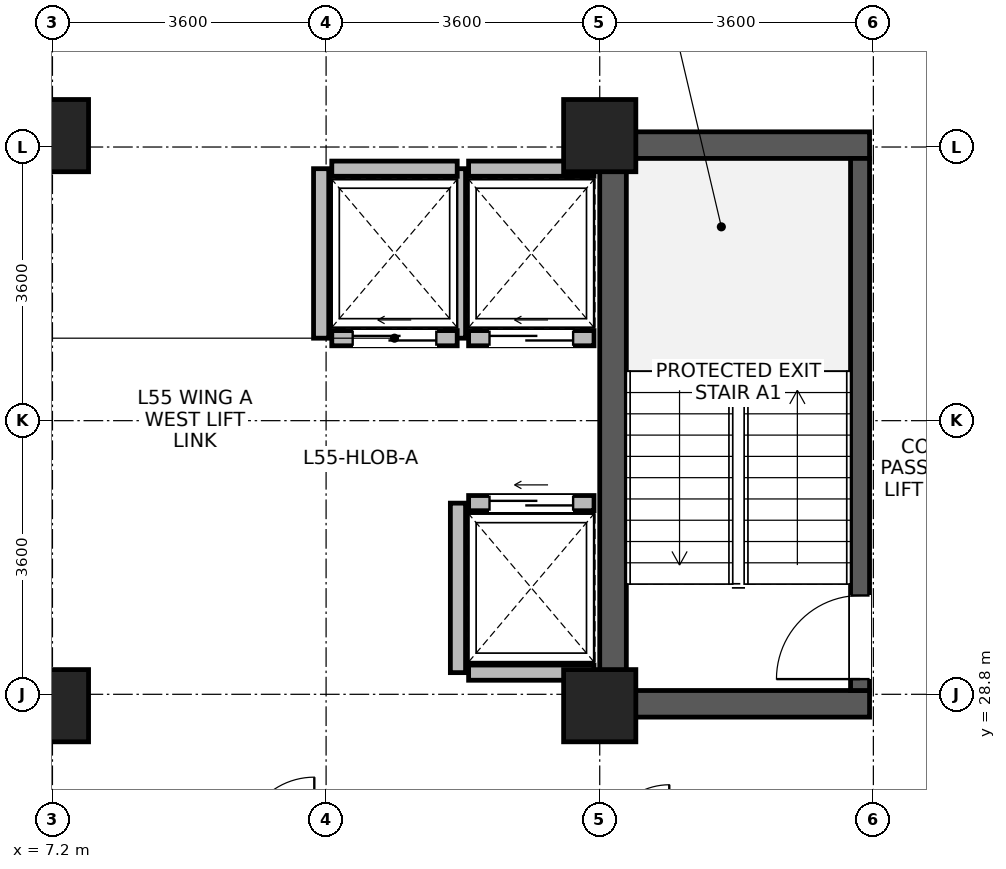
"""IFC4 building model, lengths in metres.
Left out: names, types, materials, properties, quantities, classifications, styles, units other than length and angle.
Written with IfcOpenShell. Run it as: python <this file> out.ifc"""

import sys

from ifc_helpers import new_model, si_unit, direction, frame, frame_2d, origin, origin_2d, place, context, subcontext, project, spatial, rectangle, extrude, source, transform, mapped, element, fill, save


model = new_model("IFC4")
c1 = context("Model", 3, precision=1e-05, world=origin(), true_north=direction((0.0, 1.0)))
c2 = subcontext(c1, "Body", "Model", "MODEL_VIEW")
j1 = project(units=[si_unit("LENGTHUNIT", "METRE"), si_unit("PLANEANGLEUNIT", "RADIAN")], contexts=[c1])
p1 = place(None, origin())
s1 = spatial("IfcSite", under=j1, at=p1, CompositionType="ELEMENT")
p2 = place(p1, origin())
s2 = spatial("IfcBuilding", under=s1, at=p2, CompositionType="ELEMENT")
p3 = place(p2, frame((0.0, 0.0, 216.6)))
s3 = spatial("IfcBuildingStorey", under=s2, at=p3, CompositionType="ELEMENT", Elevation=216.6)
p4 = place(p3, frame((14.575, 28.5, 0.0), z_axis=(0.0, 0.0, 1.0), x_axis=(0.0, 1.0, 0.0)))
e1 = element("IfcWall", 1, at=p4, inside=s3, PredefinedType="SHEAR", context=c2, shape_type="SweptSolid", body=[
    extrude(rectangle(XDim=7.7, YDim=0.35, at=frame_2d((3.85, 0.0))), origin(), (0.0, 0.0, 1.0), 3.47),
])
for number, where, z_axis, x_axis in (
    (2, (14.75, 28.675, 0.0), (0.0, 0.0, 1.0), (1.0, 0.0, 0.0)),
    (3, (14.75, 36.025, 0.0), (0.0, 0.0, 1.0), (1.0, 0.0, 0.0)),
):
    element("IfcWall", number, at=place(p3, frame(where, z_axis=z_axis, x_axis=x_axis)), inside=s3, PredefinedType="SHEAR", context=c2, shape_type="SweptSolid", body=[
        extrude(rectangle(XDim=3.2, YDim=0.35, at=frame_2d((1.6, 0.0))), origin(), (0.0, 0.0, 1.0), 3.47),
    ])
p5 = place(p3, frame((17.825, 28.85, 0.0), z_axis=(0.0, 0.0, 1.0), x_axis=(0.0, 1.0, 0.0)))
e4 = element("IfcWall", 4, at=p5, inside=s3, PredefinedType="SHEAR", context=c2, shape_type="SweptSolid", body=[
    extrude(rectangle(XDim=7.0, YDim=0.25, at=frame_2d((3.5, 0.0))), origin(), (0.0, 0.0, 1.0), 3.47),
])
p6 = place(p5, frame((0.15, 0.0, 0.0)))
e5 = element("IfcOpeningElement", 5, at=p6, cuts=e4, PredefinedType="OPENING", context=c2, shape_type="SweptSolid", body=[
    extrude(rectangle(XDim=1.1, YDim=2.08, at=frame_2d((0.55, 1.04))), frame((0.0, 0.135, 0.0), z_axis=(0.0, -1.0, 0.0), x_axis=(1.0, 0.0, 0.0)), (0.0, 0.0, 1.0), 0.27),
])
m1 = source(origin(), c2, "Body", "SweptSolid", [
    extrude(rectangle(XDim=0.95, YDim=0.95, at=origin_2d()), origin(), (0.0, 0.0, 1.0), 3.7),
])
for number, where, z_axis, x_axis in (
    (6, (7.2, 28.65, 0.0), (0.0, 0.0, 1.0), (1.0, 0.0, 0.0)),
    (7, (7.2, 36.15, 0.0), (0.0, 0.0, 1.0), (1.0, 0.0, 0.0)),
    (8, (14.4, 28.65, 0.0), (0.0, 0.0, 1.0), (1.0, 0.0, 0.0)),
    (9, (14.4, 36.15, 0.0), (0.0, 0.0, 1.0), (1.0, 0.0, 0.0)),
):
    element("IfcColumn", number, at=place(p3, frame(where, z_axis=z_axis, x_axis=x_axis)), inside=s3, PredefinedType="COLUMN", context=c2, shape_type="MappedRepresentation", body=[
        mapped(m1, transform((0.0, 0.0, 0.0), x_axis=(1.0, 0.0, 0.0), y_axis=(0.0, 1.0, 0.0), z_axis=(0.0, 0.0, 1.0), scale=1.0)),
    ])
p7 = place(p3, frame((12.675, 33.485, 0.0), z_axis=(0.0, 0.0, 1.0), x_axis=(1.0, 0.0, 0.0)))
e10 = element("IfcWall", 10, at=p7, inside=s3, PredefinedType="PARTITIONING", context=c2, shape_type="SweptSolid", body=[
    extrude(rectangle(XDim=1.65, YDim=0.2, at=frame_2d((0.825, 0.0))), origin(), (0.0, 0.0, 1.0), 3.45),
])
p8 = place(p7, frame((0.275, 0.0, 0.0)))
e11 = element("IfcOpeningElement", 11, at=p8, cuts=e10, PredefinedType="OPENING", context=c2, shape_type="SweptSolid", body=[
    extrude(rectangle(XDim=1.1, YDim=2.12, at=frame_2d((0.55, 1.06))), frame((0.0, 0.11, 0.0), z_axis=(0.0, -1.0, 0.0), x_axis=(1.0, 0.0, 0.0)), (0.0, 0.0, 1.0), 0.22),
])
p9 = place(p3, frame((12.675, 35.715, 0.0), z_axis=(0.0, 0.0, 1.0), x_axis=(1.0, 0.0, 0.0)))
e12 = element("IfcWall", 12, at=p9, inside=s3, PredefinedType="PARTITIONING", context=c2, shape_type="SweptSolid", body=[
    extrude(rectangle(XDim=1.65, YDim=0.2, at=frame_2d((0.825, 0.0))), origin(), (0.0, 0.0, 1.0), 3.45),
])
p10 = place(p3, frame((12.535, 33.485, 0.0), z_axis=(0.0, 0.0, 1.0), x_axis=(0.0, 1.0, 0.0)))
e13 = element("IfcWall", 13, at=p10, inside=s3, PredefinedType="PARTITIONING", context=c2, shape_type="SweptSolid", body=[
    extrude(rectangle(XDim=2.23, YDim=0.2, at=frame_2d((1.115, 0.0))), origin(), (0.0, 0.0, 1.0), 3.45),
])
p11 = place(p3, frame((12.675, 29.085, 0.0), z_axis=(0.0, 0.0, 1.0), x_axis=(1.0, 0.0, 0.0)))
e14 = element("IfcWall", 14, at=p11, inside=s3, PredefinedType="PARTITIONING", context=c2, shape_type="SweptSolid", body=[
    extrude(rectangle(XDim=1.65, YDim=0.2, at=frame_2d((0.825, 0.0))), origin(), (0.0, 0.0, 1.0), 3.45),
])
p12 = place(p3, frame((12.675, 31.315, 0.0), z_axis=(0.0, 0.0, 1.0), x_axis=(1.0, 0.0, 0.0)))
e15 = element("IfcWall", 15, at=p12, inside=s3, PredefinedType="PARTITIONING", context=c2, shape_type="SweptSolid", body=[
    extrude(rectangle(XDim=1.65, YDim=0.2, at=frame_2d((0.825, 0.0))), origin(), (0.0, 0.0, 1.0), 3.45),
])
p13 = place(p12, frame((0.275, 0.0, 0.0)))
e16 = element("IfcOpeningElement", 16, at=p13, cuts=e15, PredefinedType="OPENING", context=c2, shape_type="SweptSolid", body=[
    extrude(rectangle(XDim=1.1, YDim=2.12, at=frame_2d((0.55, 1.06))), frame((0.0, 0.11, 0.0), z_axis=(0.0, -1.0, 0.0), x_axis=(1.0, 0.0, 0.0)), (0.0, 0.0, 1.0), 0.22),
])
p14 = place(p3, frame((12.535, 29.085, 0.0), z_axis=(0.0, 0.0, 1.0), x_axis=(0.0, 1.0, 0.0)))
e17 = element("IfcWall", 17, at=p14, inside=s3, PredefinedType="PARTITIONING", context=c2, shape_type="SweptSolid", body=[
    extrude(rectangle(XDim=2.23, YDim=0.2, at=frame_2d((1.115, 0.0))), origin(), (0.0, 0.0, 1.0), 3.45),
])
p15 = place(p3, frame((10.875, 33.485, 0.0), z_axis=(0.0, 0.0, 1.0), x_axis=(1.0, 0.0, 0.0)))
e18 = element("IfcWall", 18, at=p15, inside=s3, PredefinedType="PARTITIONING", context=c2, shape_type="SweptSolid", body=[
    extrude(rectangle(XDim=1.65, YDim=0.2, at=frame_2d((0.825, 0.0))), origin(), (0.0, 0.0, 1.0), 3.45),
])
p16 = place(p15, frame((0.275, 0.0, 0.0)))
e19 = element("IfcOpeningElement", 19, at=p16, cuts=e18, PredefinedType="OPENING", context=c2, shape_type="SweptSolid", body=[
    extrude(rectangle(XDim=1.1, YDim=2.12, at=frame_2d((0.55, 1.06))), frame((0.0, 0.11, 0.0), z_axis=(0.0, -1.0, 0.0), x_axis=(1.0, 0.0, 0.0)), (0.0, 0.0, 1.0), 0.22),
])
p17 = place(p3, frame((10.875, 35.715, 0.0), z_axis=(0.0, 0.0, 1.0), x_axis=(1.0, 0.0, 0.0)))
e20 = element("IfcWall", 20, at=p17, inside=s3, PredefinedType="PARTITIONING", context=c2, shape_type="SweptSolid", body=[
    extrude(rectangle(XDim=1.65, YDim=0.2, at=frame_2d((0.825, 0.0))), origin(), (0.0, 0.0, 1.0), 3.45),
])
p18 = place(p3, frame((10.735, 33.485, 0.0), z_axis=(0.0, 0.0, 1.0), x_axis=(0.0, 1.0, 0.0)))
e21 = element("IfcWall", 21, at=p18, inside=s3, PredefinedType="PARTITIONING", context=c2, shape_type="SweptSolid", body=[
    extrude(rectangle(XDim=2.23, YDim=0.2, at=frame_2d((1.115, 0.0))), origin(), (0.0, 0.0, 1.0), 3.45),
])
p19 = place(p6, origin())
e22 = element("IfcDoor", 22, at=p19, inside=s3, OperationType="SINGLE_SWING_LEFT", PredefinedType="DOOR", context=c2, shape_type="SweptSolid", body=[
    extrude(rectangle(XDim=1.1, YDim=2.08, at=frame_2d((0.55, 1.04))), frame((0.0, 0.025, 0.0), z_axis=(0.0, -1.0, 0.0), x_axis=(1.0, 0.0, 0.0)), (0.0, 0.0, 1.0), 0.05),
])
fill(e5, e22)
p20 = place(p8, origin())
e23 = element("IfcDoor", 23, at=p20, inside=s3, OperationType="SLIDING_TO_LEFT", PredefinedType="DOOR", context=c2, shape_type="SweptSolid", body=[
    extrude(rectangle(XDim=1.1, YDim=2.12, at=frame_2d((0.55, 1.06))), frame((0.0, 0.025, 0.0), z_axis=(0.0, -1.0, 0.0), x_axis=(1.0, 0.0, 0.0)), (0.0, 0.0, 1.0), 0.05),
])
fill(e11, e23)
p21 = place(p13, origin())
e24 = element("IfcDoor", 24, at=p21, inside=s3, OperationType="SLIDING_TO_LEFT", PredefinedType="DOOR", context=c2, shape_type="SweptSolid", body=[
    extrude(rectangle(XDim=1.1, YDim=2.12, at=frame_2d((0.55, 1.06))), frame((0.0, 0.025, 0.0), z_axis=(0.0, -1.0, 0.0), x_axis=(1.0, 0.0, 0.0)), (0.0, 0.0, 1.0), 0.05),
])
fill(e16, e24)
p22 = place(p16, origin())
e25 = element("IfcDoor", 25, at=p22, inside=s3, OperationType="SLIDING_TO_LEFT", PredefinedType="DOOR", context=c2, shape_type="SweptSolid", body=[
    extrude(rectangle(XDim=1.1, YDim=2.12, at=frame_2d((0.55, 1.06))), frame((0.0, 0.025, 0.0), z_axis=(0.0, -1.0, 0.0), x_axis=(1.0, 0.0, 0.0)), (0.0, 0.0, 1.0), 0.05),
])
fill(e19, e25)
save(model, sys.argv[1])
